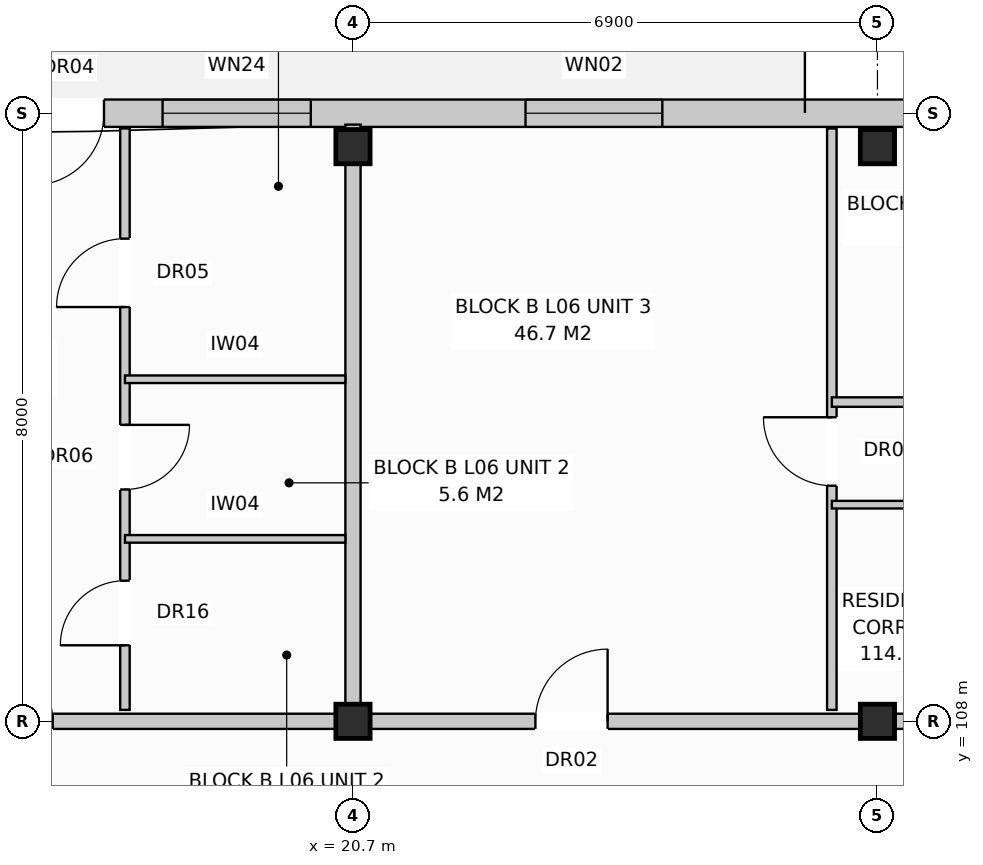
"""IFC4 building model, lengths in metres.
Left out: names, types, materials, properties, quantities, classifications, styles, units other than length and angle.
Written with IfcOpenShell. Run it as: python <this file> out.ifc"""

import sys

from ifc_helpers import new_model, si_unit, direction, frame, frame_2d, origin, origin_with_axes, origin_2d, place, context, subcontext, project, spatial, rectangle, extrude, element, fill, save


model = new_model("IFC4")
c1 = context("Model", 3, precision=1e-05, world=origin(), true_north=direction((0.0, 1.0)))
c2 = subcontext(c1, "Body", "Model", "MODEL_VIEW")
j1 = project(units=[si_unit("LENGTHUNIT", "METRE"), si_unit("PLANEANGLEUNIT", "RADIAN")], contexts=[c1])
p1 = place(None, origin())
s1 = spatial("IfcSite", under=j1, at=p1, CompositionType="ELEMENT")
p2 = place(p1, origin())
s2 = spatial("IfcBuilding", under=s1, at=p2, CompositionType="ELEMENT")
p3 = place(p2, frame((0.0, 0.0, 20.8)))
s3 = spatial("IfcBuildingStorey", under=s2, at=p3, CompositionType="ELEMENT", Elevation=20.8)
for number, where, z_axis, x_axis in (
    (1, (20.7, 108.0, 0.0), (0.0, 0.0, 1.0), (1.0, 0.0, 0.0)),
    (2, (20.7, 115.56, 0.0), (0.0, 0.0, 1.0), (1.0, 0.0, 0.0)),
    (3, (27.6, 108.0, 0.0), (0.0, 0.0, 1.0), (1.0, 0.0, 0.0)),
    (4, (27.6, 115.56, 0.0), (0.0, 0.0, 1.0), (1.0, 0.0, 0.0)),
):
    element("IfcColumn", number, at=place(p3, frame(where, z_axis=z_axis, x_axis=x_axis)), inside=s3, PredefinedType="COLUMN", context=c2, shape_type="SweptSolid", body=[
        extrude(rectangle(XDim=0.45, YDim=0.45, at=origin_2d()), origin(), (0.0, 0.0, 1.0), 3.2),
    ])
p4 = place(p3, frame((0.17, 116.0, 0.0), z_axis=(0.0, 0.0, 1.0), x_axis=(1.0, 0.0, 0.0)))
e5 = element("IfcWall", 5, at=p4, inside=s3, PredefinedType="STANDARD", context=c2, shape_type="SweptSolid", body=[
    extrude(rectangle(XDim=54.86, YDim=0.36, at=frame_2d((27.43, 0.0))), origin(), (0.0, 0.0, 1.0), 2.95),
])
p5 = place(p4, frame((2.804, 0.0, 0.0)))
e6 = element("IfcOpeningElement", 6, at=p5, cuts=e5, PredefinedType="OPENING", context=c2, shape_type="SweptSolid", body=[
    extrude(rectangle(XDim=0.95, YDim=2.1, at=frame_2d((0.475, 1.05))), frame((0.0, 0.192, 0.0), z_axis=(0.0, -1.0, 0.0), x_axis=(1.0, 0.0, 0.0)), (0.0, 0.0, 1.0), 0.384),
])
p6 = place(p4, frame((16.304, 0.0, 0.0)))
e7 = element("IfcOpeningElement", 7, at=p6, cuts=e5, PredefinedType="OPENING", context=c2, shape_type="SweptSolid", body=[
    extrude(rectangle(XDim=0.95, YDim=2.1, at=frame_2d((0.475, 1.05))), frame((0.0, 0.192, 0.0), z_axis=(0.0, -1.0, 0.0), x_axis=(1.0, 0.0, 0.0)), (0.0, 0.0, 1.0), 0.384),
])
p7 = place(p4, frame((30.804, 0.0, 0.0)))
e8 = element("IfcOpeningElement", 8, at=p7, cuts=e5, PredefinedType="OPENING", context=c2, shape_type="SweptSolid", body=[
    extrude(rectangle(XDim=0.95, YDim=2.1, at=frame_2d((0.475, 1.05))), frame((0.0, 0.192, 0.0), z_axis=(0.0, -1.0, 0.0), x_axis=(1.0, 0.0, 0.0)), (0.0, 0.0, 1.0), 0.384),
])
p8 = place(p4, frame((48.8, 0.0, 0.0)))
e9 = element("IfcOpeningElement", 9, at=p8, cuts=e5, PredefinedType="OPENING", context=c2, shape_type="SweptSolid", body=[
    extrude(rectangle(XDim=0.95, YDim=2.1, at=frame_2d((0.475, 1.05))), frame((0.0, 0.192, 0.0), z_axis=(0.0, -1.0, 0.0), x_axis=(1.0, 0.0, 0.0)), (0.0, 0.0, 1.0), 0.384),
])
p9 = place(p4, frame((0.65, 0.0, 0.8)))
e10 = element("IfcOpeningElement", 10, at=p9, cuts=e5, PredefinedType="OPENING", context=c2, shape_type="SweptSolid", body=[
    extrude(rectangle(XDim=1.9, YDim=1.85, at=frame_2d((0.95, 0.925))), frame((0.0, 0.192, 0.0), z_axis=(0.0, -1.0, 0.0), x_axis=(1.0, 0.0, 0.0)), (0.0, 0.0, 1.0), 0.384),
])
p10 = place(p4, frame((4.325, 0.0, 0.8)))
e11 = element("IfcOpeningElement", 11, at=p10, cuts=e5, PredefinedType="OPENING", context=c2, shape_type="SweptSolid", body=[
    extrude(rectangle(XDim=1.95, YDim=1.65, at=frame_2d((0.975, 0.825))), frame((0.0, 0.192, 0.0), z_axis=(0.0, -1.0, 0.0), x_axis=(1.0, 0.0, 0.0)), (0.0, 0.0, 1.0), 0.384),
])
p11 = place(p4, frame((10.1, 0.0, 0.8)))
e12 = element("IfcOpeningElement", 12, at=p11, cuts=e5, PredefinedType="OPENING", context=c2, shape_type="SweptSolid", body=[
    extrude(rectangle(XDim=1.8, YDim=1.7, at=frame_2d((0.9, 0.85))), frame((0.0, 0.192, 0.0), z_axis=(0.0, -1.0, 0.0), x_axis=(1.0, 0.0, 0.0)), (0.0, 0.0, 1.0), 0.384),
])
p12 = place(p4, frame((14.55, 0.0, 0.72)))
e13 = element("IfcOpeningElement", 13, at=p12, cuts=e5, PredefinedType="OPENING", context=c2, shape_type="SweptSolid", body=[
    extrude(rectangle(XDim=1.1, YDim=1.5, at=frame_2d((0.55, 0.75))), frame((0.0, 0.192, 0.0), z_axis=(0.0, -1.0, 0.0), x_axis=(1.0, 0.0, 0.0)), (0.0, 0.0, 1.0), 0.384),
])
p13 = place(p4, frame((18.025, 0.0, 0.8)))
e14 = element("IfcOpeningElement", 14, at=p13, cuts=e5, PredefinedType="OPENING", context=c2, shape_type="SweptSolid", body=[
    extrude(rectangle(XDim=1.95, YDim=1.65, at=frame_2d((0.975, 0.825))), frame((0.0, 0.192, 0.0), z_axis=(0.0, -1.0, 0.0), x_axis=(1.0, 0.0, 0.0)), (0.0, 0.0, 1.0), 0.384),
])
p14 = place(p4, frame((22.8, 0.0, 0.8)))
e15 = element("IfcOpeningElement", 15, at=p14, cuts=e5, PredefinedType="OPENING", context=c2, shape_type="SweptSolid", body=[
    extrude(rectangle(XDim=1.8, YDim=1.7, at=frame_2d((0.9, 0.85))), frame((0.0, 0.192, 0.0), z_axis=(0.0, -1.0, 0.0), x_axis=(1.0, 0.0, 0.0)), (0.0, 0.0, 1.0), 0.384),
])
p15 = place(p4, frame((28.85, 0.0, 0.72)))
e16 = element("IfcOpeningElement", 16, at=p15, cuts=e5, PredefinedType="OPENING", context=c2, shape_type="SweptSolid", body=[
    extrude(rectangle(XDim=1.1, YDim=1.5, at=frame_2d((0.55, 0.75))), frame((0.0, 0.192, 0.0), z_axis=(0.0, -1.0, 0.0), x_axis=(1.0, 0.0, 0.0)), (0.0, 0.0, 1.0), 0.384),
])
p16 = place(p4, frame((34.825, 0.0, 0.8)))
e17 = element("IfcOpeningElement", 17, at=p16, cuts=e5, PredefinedType="OPENING", context=c2, shape_type="SweptSolid", body=[
    extrude(rectangle(XDim=1.95, YDim=1.65, at=frame_2d((0.975, 0.825))), frame((0.0, 0.192, 0.0), z_axis=(0.0, -1.0, 0.0), x_axis=(1.0, 0.0, 0.0)), (0.0, 0.0, 1.0), 0.384),
])
p17 = place(p4, frame((38.3, 0.0, 0.8)))
e18 = element("IfcOpeningElement", 18, at=p17, cuts=e5, PredefinedType="OPENING", context=c2, shape_type="SweptSolid", body=[
    extrude(rectangle(XDim=1.8, YDim=1.7, at=frame_2d((0.9, 0.85))), frame((0.0, 0.192, 0.0), z_axis=(0.0, -1.0, 0.0), x_axis=(1.0, 0.0, 0.0)), (0.0, 0.0, 1.0), 0.384),
])
p18 = place(p4, frame((42.95, 0.0, 0.8)))
e19 = element("IfcOpeningElement", 19, at=p18, cuts=e5, PredefinedType="OPENING", context=c2, shape_type="SweptSolid", body=[
    extrude(rectangle(XDim=1.9, YDim=1.85, at=frame_2d((0.95, 0.925))), frame((0.0, 0.192, 0.0), z_axis=(0.0, -1.0, 0.0), x_axis=(1.0, 0.0, 0.0)), (0.0, 0.0, 1.0), 0.384),
])
p19 = place(p4, frame((51.825, 0.0, 0.8)))
e20 = element("IfcOpeningElement", 20, at=p19, cuts=e5, PredefinedType="OPENING", context=c2, shape_type="SweptSolid", body=[
    extrude(rectangle(XDim=1.95, YDim=1.65, at=frame_2d((0.975, 0.825))), frame((0.0, 0.192, 0.0), z_axis=(0.0, -1.0, 0.0), x_axis=(1.0, 0.0, 0.0)), (0.0, 0.0, 1.0), 0.384),
])
p20 = place(p3, frame((20.7, 108.15, 0.0), z_axis=(0.0, 0.0, 1.0), x_axis=(0.0, 1.0, 0.0)))
e21 = element("IfcWall", 21, at=p20, inside=s3, PredefinedType="PARTITIONING", context=c2, shape_type="SweptSolid", body=[
    extrude(rectangle(XDim=7.7, YDim=0.2, at=frame_2d((3.85, 0.0))), origin(), (0.0, 0.0, 1.0), 2.95),
])
p21 = place(p3, frame((13.8, 108.0, 0.0), z_axis=(0.0, 0.0, 1.0), x_axis=(1.0, 0.0, 0.0)))
e22 = element("IfcWall", 22, at=p21, inside=s3, PredefinedType="PARTITIONING", context=c2, shape_type="SweptSolid", body=[
    extrude(rectangle(XDim=6.9, YDim=0.2, at=frame_2d((3.45, 0.0))), origin(), (0.0, 0.0, 1.0), 2.39),
])
p22 = place(p21, frame((2.0, 0.0, 0.0)))
e23 = element("IfcOpeningElement", 23, at=p22, cuts=e22, PredefinedType="OPENING", context=c2, shape_type="SweptSolid", body=[
    extrude(rectangle(XDim=0.95, YDim=2.15, at=frame_2d((0.475, 1.075))), frame((0.0, 0.112, 0.0), z_axis=(0.0, -1.0, 0.0), x_axis=(1.0, 0.0, 0.0)), (0.0, 0.0, 1.0), 0.224),
])
p23 = place(p3, frame((17.7, 108.15, 0.0), z_axis=(0.0, 0.0, 1.0), x_axis=(0.0, 1.0, 0.0)))
e24 = element("IfcWall", 24, at=p23, inside=s3, PredefinedType="PARTITIONING", context=c2, shape_type="SweptSolid", body=[
    extrude(rectangle(XDim=7.65, YDim=0.125, at=frame_2d((3.825, 0.0))), origin(), (0.0, 0.0, 1.0), 2.95),
])
p24 = place(p23, frame((0.85, 0.0, 0.0)))
e25 = element("IfcOpeningElement", 25, at=p24, cuts=e24, PredefinedType="OPENING", context=c2, shape_type="SweptSolid", body=[
    extrude(rectangle(XDim=0.85, YDim=2.1, at=frame_2d((0.425, 1.05))), frame((0.0, 0.074, 0.0), z_axis=(0.0, -1.0, 0.0), x_axis=(1.0, 0.0, 0.0)), (0.0, 0.0, 1.0), 0.149),
])
p25 = place(p23, frame((2.9, 0.0, 0.0)))
e26 = element("IfcOpeningElement", 26, at=p25, cuts=e24, PredefinedType="OPENING", context=c2, shape_type="SweptSolid", body=[
    extrude(rectangle(XDim=0.85, YDim=2.05, at=frame_2d((0.425, 1.025))), frame((0.0, 0.074, 0.0), z_axis=(0.0, -1.0, 0.0), x_axis=(1.0, 0.0, 0.0)), (0.0, 0.0, 1.0), 0.149),
])
p26 = place(p23, frame((5.3, 0.0, 0.0)))
e27 = element("IfcOpeningElement", 27, at=p26, cuts=e24, PredefinedType="OPENING", context=c2, shape_type="SweptSolid", body=[
    extrude(rectangle(XDim=0.9, YDim=2.1, at=frame_2d((0.45, 1.05))), frame((0.0, 0.074, 0.0), z_axis=(0.0, -1.0, 0.0), x_axis=(1.0, 0.0, 0.0)), (0.0, 0.0, 1.0), 0.149),
])
for number, where, z_axis, x_axis in (
    (28, (17.7, 110.4, 0.0), (0.0, 0.0, 1.0), (1.0, 0.0, 0.0)),
    (29, (17.7, 112.5, 0.0), (0.0, 0.0, 1.0), (1.0, 0.0, 0.0)),
):
    element("IfcWall", number, at=place(p3, frame(where, z_axis=z_axis, x_axis=x_axis)), inside=s3, PredefinedType="PARTITIONING", context=c2, shape_type="SweptSolid", body=[
        extrude(rectangle(XDim=2.9, YDim=0.1, at=frame_2d((1.45, 0.0))), origin(), (0.0, 0.0, 1.0), 2.95),
    ])
p27 = place(p3, frame((20.7, 108.0, 0.0), z_axis=(0.0, 0.0, 1.0), x_axis=(1.0, 0.0, 0.0)))
e30 = element("IfcWall", 30, at=p27, inside=s3, PredefinedType="PARTITIONING", context=c2, shape_type="SweptSolid", body=[
    extrude(rectangle(XDim=20.7, YDim=0.2, at=frame_2d((10.35, 0.0))), origin(), (0.0, 0.0, 1.0), 2.39),
])
p28 = place(p27, frame((2.4, 0.0, 0.0)))
e31 = element("IfcOpeningElement", 31, at=p28, cuts=e30, PredefinedType="OPENING", context=c2, shape_type="SweptSolid", body=[
    extrude(rectangle(XDim=0.95, YDim=2.15, at=frame_2d((0.475, 1.075))), frame((0.0, 0.112, 0.0), z_axis=(0.0, -1.0, 0.0), x_axis=(1.0, 0.0, 0.0)), (0.0, 0.0, 1.0), 0.224),
])
p29 = place(p3, frame((27.0, 108.15, 0.0), z_axis=(0.0, 0.0, 1.0), x_axis=(0.0, 1.0, 0.0)))
e32 = element("IfcWall", 32, at=p29, inside=s3, PredefinedType="PARTITIONING", context=c2, shape_type="SweptSolid", body=[
    extrude(rectangle(XDim=7.65, YDim=0.125, at=frame_2d((3.825, 0.0))), origin(), (0.0, 0.0, 1.0), 2.59),
])
p30 = place(p29, frame((2.95, 0.0, 0.0)))
e33 = element("IfcOpeningElement", 33, at=p30, cuts=e32, PredefinedType="OPENING", context=c2, shape_type="SweptSolid", body=[
    extrude(rectangle(XDim=0.9, YDim=2.1, at=frame_2d((0.45, 1.05))), frame((0.0, 0.074, 0.0), z_axis=(0.0, -1.0, 0.0), x_axis=(1.0, 0.0, 0.0)), (0.0, 0.0, 1.0), 0.149),
])
p31 = place(p3, frame((27.0, 110.85, 0.0), z_axis=(0.0, 0.0, 1.0), x_axis=(1.0, 0.0, 0.0)))
e34 = element("IfcWall", 34, at=p31, inside=s3, PredefinedType="PARTITIONING", context=c2, shape_type="SweptSolid", body=[
    extrude(rectangle(XDim=14.3, YDim=0.1, at=frame_2d((7.15, 0.0))), origin(), (0.0, 0.0, 1.0), 2.95),
])
p32 = place(p31, frame((1.6, 0.0, 0.0)))
e35 = element("IfcOpeningElement", 35, at=p32, cuts=e34, PredefinedType="OPENING", context=c2, shape_type="SweptSolid", body=[
    extrude(rectangle(XDim=0.9, YDim=2.1, at=frame_2d((0.45, 1.05))), frame((0.0, 0.062, 0.0), z_axis=(0.0, -1.0, 0.0), x_axis=(1.0, 0.0, 0.0)), (0.0, 0.0, 1.0), 0.124),
])
p33 = place(p31, frame((5.1, 0.0, 0.0)))
e36 = element("IfcOpeningElement", 36, at=p33, cuts=e34, PredefinedType="OPENING", context=c2, shape_type="SweptSolid", body=[
    extrude(rectangle(XDim=0.85, YDim=2.05, at=frame_2d((0.425, 1.025))), frame((0.0, 0.062, 0.0), z_axis=(0.0, -1.0, 0.0), x_axis=(1.0, 0.0, 0.0)), (0.0, 0.0, 1.0), 0.124),
])
p34 = place(p31, frame((8.2, 0.0, 0.0)))
e37 = element("IfcOpeningElement", 37, at=p34, cuts=e34, PredefinedType="OPENING", context=c2, shape_type="SweptSolid", body=[
    extrude(rectangle(XDim=0.85, YDim=2.05, at=frame_2d((0.425, 1.025))), frame((0.0, 0.062, 0.0), z_axis=(0.0, -1.0, 0.0), x_axis=(1.0, 0.0, 0.0)), (0.0, 0.0, 1.0), 0.124),
])
p35 = place(p31, frame((11.6, 0.0, 0.0)))
e38 = element("IfcOpeningElement", 38, at=p35, cuts=e34, PredefinedType="OPENING", context=c2, shape_type="SweptSolid", body=[
    extrude(rectangle(XDim=0.85, YDim=2.05, at=frame_2d((0.425, 1.025))), frame((0.0, 0.062, 0.0), z_axis=(0.0, -1.0, 0.0), x_axis=(1.0, 0.0, 0.0)), (0.0, 0.0, 1.0), 0.124),
])
p36 = place(p3, frame((27.0, 112.2, 0.0), z_axis=(0.0, 0.0, 1.0), x_axis=(1.0, 0.0, 0.0)))
e39 = element("IfcWall", 39, at=p36, inside=s3, PredefinedType="PARTITIONING", context=c2, shape_type="SweptSolid", body=[
    extrude(rectangle(XDim=10.4, YDim=0.125, at=frame_2d((5.2, 0.0))), origin(), (0.0, 0.0, 1.0), 2.95),
])
p37 = place(p36, frame((2.0, 0.0, 0.0)))
e40 = element("IfcOpeningElement", 40, at=p37, cuts=e39, PredefinedType="OPENING", context=c2, shape_type="SweptSolid", body=[
    extrude(rectangle(XDim=0.9, YDim=2.1, at=frame_2d((0.45, 1.05))), frame((0.0, 0.074, 0.0), z_axis=(0.0, -1.0, 0.0), x_axis=(1.0, 0.0, 0.0)), (0.0, 0.0, 1.0), 0.149),
])
p38 = place(p36, frame((7.2, 0.0, 0.0)))
e41 = element("IfcOpeningElement", 41, at=p38, cuts=e39, PredefinedType="OPENING", context=c2, shape_type="SweptSolid", body=[
    extrude(rectangle(XDim=0.9, YDim=2.1, at=frame_2d((0.45, 1.05))), frame((0.0, 0.074, 0.0), z_axis=(0.0, -1.0, 0.0), x_axis=(1.0, 0.0, 0.0)), (0.0, 0.0, 1.0), 0.149),
])
p39 = place(p6, frame((0.95, 0.0, 0.0), z_axis=(0.0, 0.0, 1.0), x_axis=(-1.0, 0.0, 0.0)))
e42 = element("IfcDoor", 42, at=p39, inside=s3, OperationType="SINGLE_SWING_LEFT", PredefinedType="DOOR", context=c2, shape_type="SweptSolid", body=[
    extrude(rectangle(XDim=0.95, YDim=2.1, at=frame_2d((0.475, 1.05))), frame((0.0, 0.025, 0.0), z_axis=(0.0, -1.0, 0.0), x_axis=(1.0, 0.0, 0.0)), (0.0, 0.0, 1.0), 0.05),
])
fill(e7, e42)
p40 = place(p13, origin_with_axes())
e43 = element("IfcWindow", 43, at=p40, inside=s3, PartitioningType="SINGLE_PANEL", PredefinedType="WINDOW", context=c2, shape_type="SweptSolid", body=[
    extrude(rectangle(XDim=1.95, YDim=1.65, at=frame_2d((0.975, 0.825))), frame((0.0, 0.03, 0.0), z_axis=(0.0, -1.0, 0.0), x_axis=(1.0, 0.0, 0.0)), (0.0, 0.0, 1.0), 0.06),
])
fill(e14, e43)
p41 = place(p14, origin_with_axes())
e44 = element("IfcWindow", 44, at=p41, inside=s3, PartitioningType="SINGLE_PANEL", PredefinedType="WINDOW", context=c2, shape_type="SweptSolid", body=[
    extrude(rectangle(XDim=1.8, YDim=1.7, at=frame_2d((0.9, 0.85))), frame((0.0, 0.03, 0.0), z_axis=(0.0, -1.0, 0.0), x_axis=(1.0, 0.0, 0.0)), (0.0, 0.0, 1.0), 0.06),
])
fill(e15, e44)
p42 = place(p22, origin_with_axes())
e45 = element("IfcDoor", 45, at=p42, inside=s3, OperationType="SINGLE_SWING_LEFT", PredefinedType="DOOR", context=c2, shape_type="SweptSolid", body=[
    extrude(rectangle(XDim=0.95, YDim=2.15, at=frame_2d((0.475, 1.075))), frame((0.0, 0.025, 0.0), z_axis=(0.0, -1.0, 0.0), x_axis=(1.0, 0.0, 0.0)), (0.0, 0.0, 1.0), 0.05),
])
fill(e23, e45)
p43 = place(p24, origin_with_axes())
e46 = element("IfcDoor", 46, at=p43, inside=s3, OperationType="SINGLE_SWING_LEFT", PredefinedType="DOOR", context=c2, shape_type="SweptSolid", body=[
    extrude(rectangle(XDim=0.85, YDim=2.1, at=frame_2d((0.425, 1.05))), frame((0.0, 0.025, 0.0), z_axis=(0.0, -1.0, 0.0), x_axis=(1.0, 0.0, 0.0)), (0.0, 0.0, 1.0), 0.05),
])
fill(e25, e46)
p44 = place(p25, frame((0.85, 0.0, 0.0), z_axis=(0.0, 0.0, 1.0), x_axis=(-1.0, 0.0, 0.0)))
e47 = element("IfcDoor", 47, at=p44, inside=s3, OperationType="SINGLE_SWING_RIGHT", PredefinedType="DOOR", context=c2, shape_type="SweptSolid", body=[
    extrude(rectangle(XDim=0.85, YDim=2.05, at=frame_2d((0.425, 1.025))), frame((0.0, 0.025, 0.0), z_axis=(0.0, -1.0, 0.0), x_axis=(1.0, 0.0, 0.0)), (0.0, 0.0, 1.0), 0.05),
])
fill(e26, e47)
p45 = place(p26, origin_with_axes())
e48 = element("IfcDoor", 48, at=p45, inside=s3, OperationType="SINGLE_SWING_LEFT", PredefinedType="DOOR", context=c2, shape_type="SweptSolid", body=[
    extrude(rectangle(XDim=0.9, YDim=2.1, at=frame_2d((0.45, 1.05))), frame((0.0, 0.025, 0.0), z_axis=(0.0, -1.0, 0.0), x_axis=(1.0, 0.0, 0.0)), (0.0, 0.0, 1.0), 0.05),
])
fill(e27, e48)
p46 = place(p28, origin_with_axes())
e49 = element("IfcDoor", 49, at=p46, inside=s3, OperationType="SINGLE_SWING_RIGHT", PredefinedType="DOOR", context=c2, shape_type="SweptSolid", body=[
    extrude(rectangle(XDim=0.95, YDim=2.15, at=frame_2d((0.475, 1.075))), frame((0.0, 0.025, 0.0), z_axis=(0.0, -1.0, 0.0), x_axis=(1.0, 0.0, 0.0)), (0.0, 0.0, 1.0), 0.05),
])
fill(e31, e49)
p47 = place(p30, origin_with_axes())
e50 = element("IfcDoor", 50, at=p47, inside=s3, OperationType="SINGLE_SWING_RIGHT", PredefinedType="DOOR", context=c2, shape_type="SweptSolid", body=[
    extrude(rectangle(XDim=0.9, YDim=2.1, at=frame_2d((0.45, 1.05))), frame((0.0, 0.025, 0.0), z_axis=(0.0, -1.0, 0.0), x_axis=(1.0, 0.0, 0.0)), (0.0, 0.0, 1.0), 0.05),
])
fill(e33, e50)
save(model, sys.argv[1])
